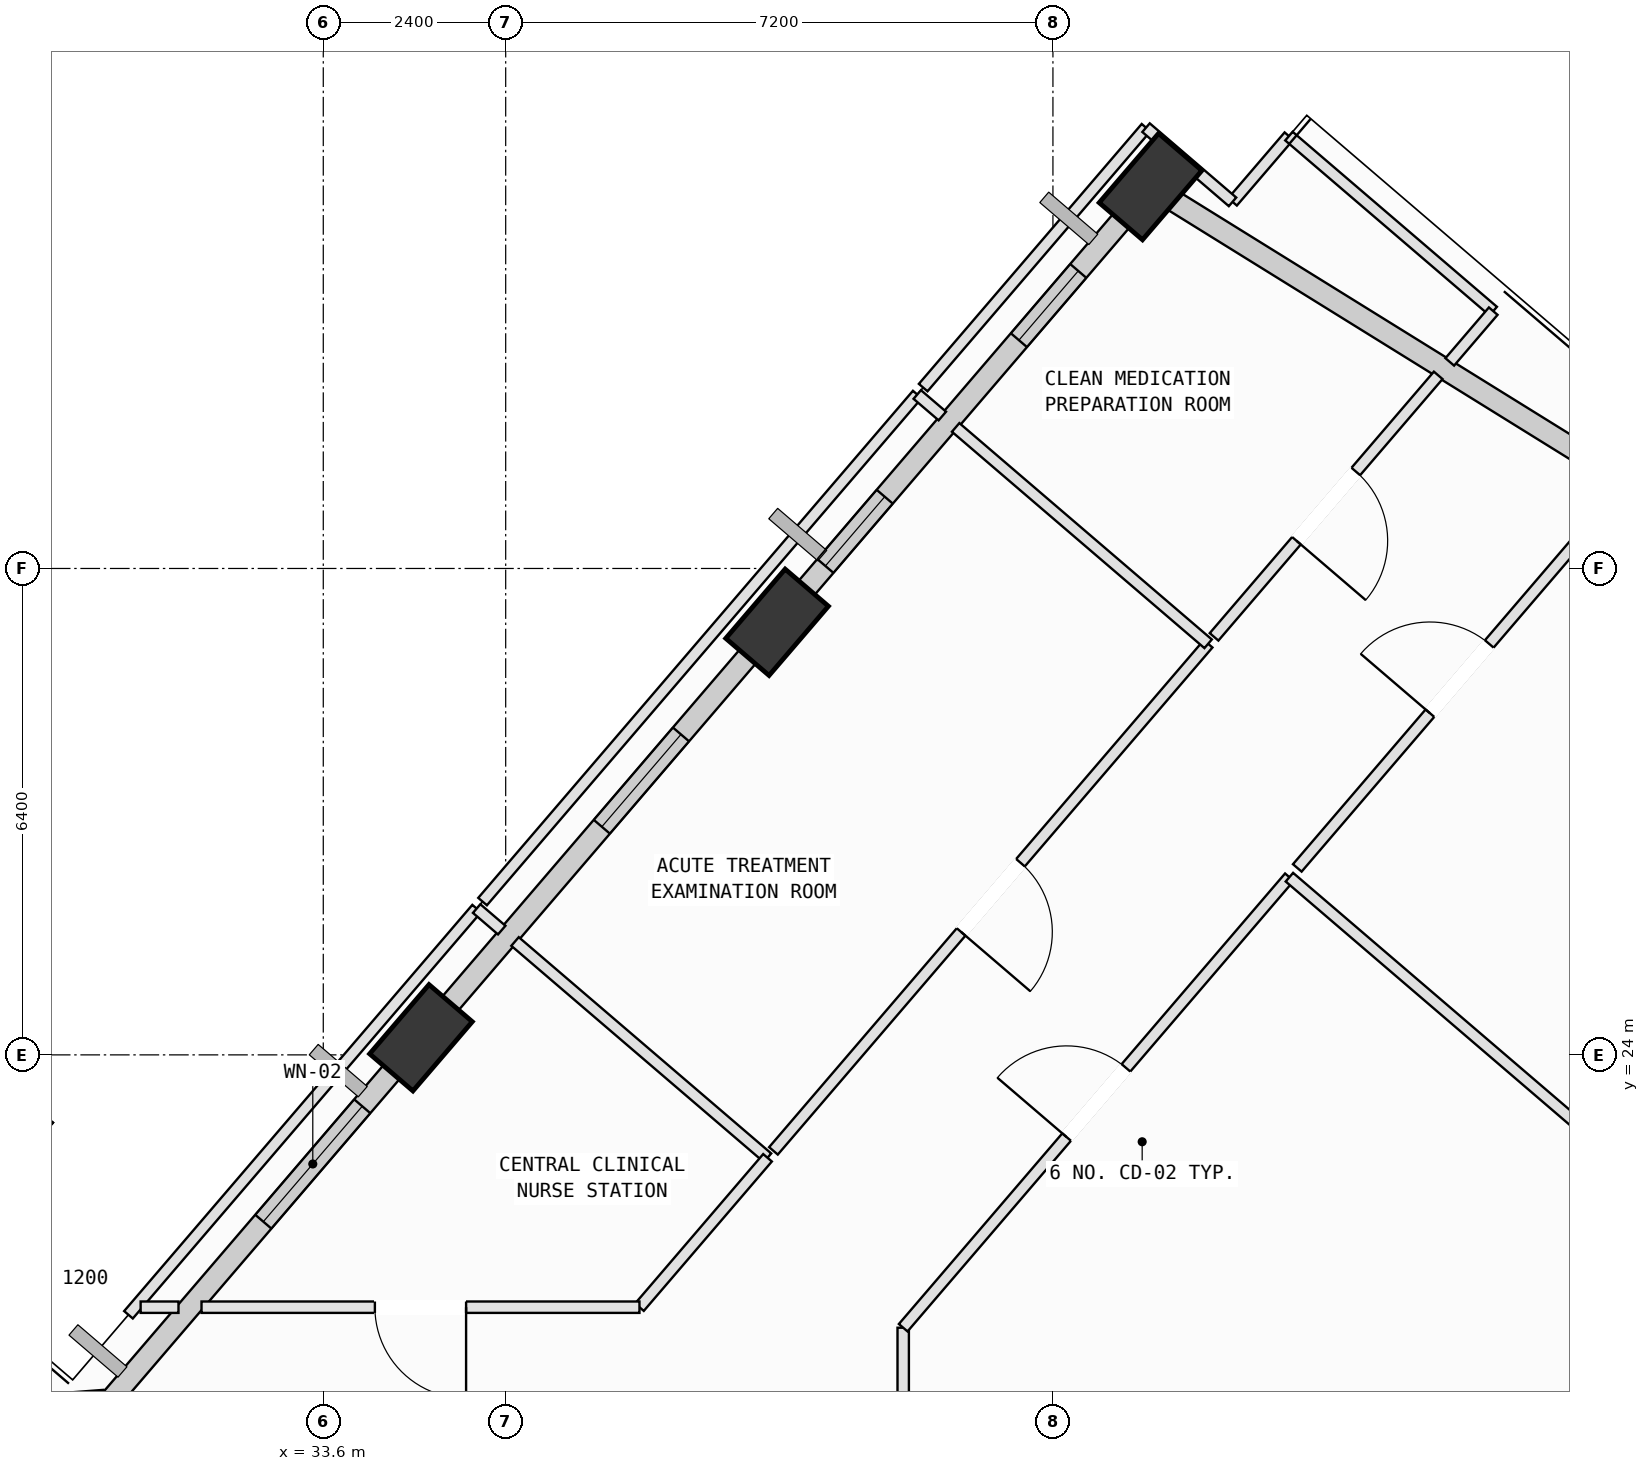
"""IFC4 building model, lengths in metres.
Left out: names, types, materials, properties, quantities, classifications, styles, units other than length and angle.
Written with IfcOpenShell. Run it as: python <this file> out.ifc"""

import sys

from ifc_helpers import new_model, si_unit, direction, frame, frame_2d, origin, origin_2d, place, context, subcontext, project, spatial, rectangle, extrude, element, fill, save


model = new_model("IFC4")
c1 = context("Model", 3, precision=1e-05, world=origin(), true_north=direction((0.0, 1.0)))
c2 = subcontext(c1, "Body", "Model", "MODEL_VIEW")
j1 = project(units=[si_unit("LENGTHUNIT", "METRE"), si_unit("PLANEANGLEUNIT", "RADIAN")], contexts=[c1])
p1 = place(None, origin())
s1 = spatial("IfcSite", under=j1, at=p1, CompositionType="ELEMENT")
p2 = place(p1, origin())
s2 = spatial("IfcBuilding", under=s1, at=p2, CompositionType="ELEMENT")
p3 = place(p2, frame((0.0, 0.0, 235.2)))
s3 = spatial("IfcBuildingStorey", under=s2, at=p3, CompositionType="ELEMENT", Elevation=235.2)
p4 = place(p3, frame((44.484, 35.425, 0.002), z_axis=(-0.04432527086, 0.044630121416, 0.998019750619), x_axis=(0.072242174873, -0.996243007169, 0.047759175416)))
e1 = element("IfcColumn", 1, at=p4, inside=s3, PredefinedType="COLUMN", context=c2, shape_type="SweptSolid", body=[
    extrude(rectangle(XDim=1.2, YDim=0.75, at=origin_2d()), origin(), (0.0, 0.0, 1.0), 4.004),
])
p5 = place(p3, frame((39.571, 29.692, 0.002), z_axis=(-0.020455033896, 0.024607100478, 0.999487909979), x_axis=(-0.015334973409, -0.999587193409, 0.024295706693)))
e2 = element("IfcColumn", 2, at=p5, inside=s3, PredefinedType="COLUMN", context=c2, shape_type="SweptSolid", body=[
    extrude(rectangle(XDim=1.2, YDim=0.75, at=origin_2d()), origin(), (0.0, 0.0, 1.0), 3.998),
])
p6 = place(p3, frame((34.885, 24.225, 0.002), z_axis=(0.002382511195, 0.005375922696, 0.999982711398), x_axis=(-0.902595371607, -0.430466795251, 0.004464676979)))
e3 = element("IfcColumn", 3, at=p6, inside=s3, PredefinedType="COLUMN", context=c2, shape_type="SweptSolid", body=[
    extrude(rectangle(XDim=1.2, YDim=0.75, at=origin_2d()), origin(), (0.0, 0.0, 1.0), 3.996),
])
p7 = place(p3, frame((44.717, 35.28, 0.0), z_axis=(0.0, 0.0, 1.0), x_axis=(0.849811688813, -0.527086419439, 0.0)))
e4 = element("IfcWall", 4, at=p7, inside=s3, PredefinedType="SOLIDWALL", context=c2, shape_type="SweptSolid", body=[
    extrude(rectangle(XDim=9.036, YDim=0.28, at=frame_2d((4.518, 0.0))), origin(), (0.0, 0.0, 1.0), 3.265),
])
p8 = place(p3, frame((39.833, 29.998, 0.0), z_axis=(0.0, 0.0, 1.0), x_axis=(0.650773580077, 0.759271853471, 0.0)))
e5 = element("IfcWall", 5, at=p8, inside=s3, PredefinedType="SOLIDWALL", context=c2, shape_type="SweptSolid", body=[
    extrude(rectangle(XDim=6.78, YDim=0.28, at=frame_2d((3.39, 0.0))), origin(), (0.0, 0.0, 1.0), 3.265),
])
p9 = place(p8, frame((4.486, 0.0, 0.75)))
e6 = element("IfcOpeningElement", 6, at=p9, cuts=e5, PredefinedType="OPENING", context=c2, shape_type="SweptSolid", body=[
    extrude(rectangle(XDim=1.2, YDim=1.75, at=frame_2d((0.6, 0.875))), frame((0.0, 0.15, 0.0), z_axis=(0.0, -1.0, 0.0), x_axis=(1.0, 0.0, 0.0)), (0.0, 0.0, 1.0), 0.3),
])
p10 = place(p8, frame((0.573, 0.0, 0.75)))
e7 = element("IfcOpeningElement", 7, at=p10, cuts=e5, PredefinedType="OPENING", context=c2, shape_type="SweptSolid", body=[
    extrude(rectangle(XDim=1.2, YDim=1.75, at=frame_2d((0.6, 0.875))), frame((0.0, 0.15, 0.0), z_axis=(0.0, -1.0, 0.0), x_axis=(1.0, 0.0, 0.0)), (0.0, 0.0, 1.0), 0.3),
])
p11 = place(p3, frame((35.151, 24.535, 0.0), z_axis=(0.0, 0.0, 1.0), x_axis=(0.65076314179, 0.759280800026, 0.0)))
e8 = element("IfcWall", 8, at=p11, inside=s3, PredefinedType="SOLIDWALL", context=c2, shape_type="SweptSolid", body=[
    extrude(rectangle(XDim=6.41, YDim=0.28, at=frame_2d((3.205, 0.0))), origin(), (0.0, 0.0, 1.0), 3.265),
])
p12 = place(p11, frame((3.248, 0.0, 0.75)))
e9 = element("IfcOpeningElement", 9, at=p12, cuts=e8, PredefinedType="OPENING", context=c2, shape_type="SweptSolid", body=[
    extrude(rectangle(XDim=1.6, YDim=1.95, at=frame_2d((0.8, 0.975))), frame((0.0, 0.15, 0.0), z_axis=(0.0, -1.0, 0.0), x_axis=(1.0, 0.0, 0.0)), (0.0, 0.0, 1.0), 0.3),
])
p13 = place(p3, frame((30.626, 19.256, 0.0), z_axis=(0.0, 0.0, 1.0), x_axis=(0.650768519131, 0.75927619119, 0.0)))
e10 = element("IfcWall", 10, at=p13, inside=s3, PredefinedType="SOLIDWALL", context=c2, shape_type="SweptSolid", body=[
    extrude(rectangle(XDim=6.158, YDim=0.28, at=frame_2d((3.079, 0.0))), origin(), (0.0, 0.0, 1.0), 3.265),
])
p14 = place(p13, frame((3.357, 0.0, 0.75)))
e11 = element("IfcOpeningElement", 11, at=p14, cuts=e10, PredefinedType="OPENING", context=c2, shape_type="SweptSolid", body=[
    extrude(rectangle(XDim=2.0, YDim=1.95, at=frame_2d((1.0, 0.975))), frame((0.0, 0.15, 0.0), z_axis=(0.0, -1.0, 0.0), x_axis=(1.0, 0.0, 0.0)), (0.0, 0.0, 1.0), 0.3),
])
p15 = place(p3, frame((41.23, 17.95, 0.0), z_axis=(0.0, 0.0, 1.0), x_axis=(0.0, 1.0, 0.0)))
e12 = element("IfcWall", 12, at=p15, inside=s3, PredefinedType="PARTITIONING", context=c2, shape_type="SweptSolid", body=[
    extrude(rectangle(XDim=2.46, YDim=0.15, at=frame_2d((1.23, 0.0))), origin(), (0.0, 0.0, 1.0), 3.78),
])
p16 = place(p3, frame((41.23, 20.41, 0.0), z_axis=(0.0, 0.0, 1.0), x_axis=(0.650786223128, 0.759261016902, 0.0)))
e13 = element("IfcWall", 13, at=p16, inside=s3, PredefinedType="PARTITIONING", context=c2, shape_type="SweptSolid", body=[
    extrude(rectangle(XDim=7.808, YDim=0.15, at=frame_2d((3.904, 0.0))), origin(), (0.0, 0.0, 1.0), 3.78),
])
p17 = place(p16, frame((3.304, 0.0, 0.0)))
e14 = element("IfcOpeningElement", 14, at=p17, cuts=e13, PredefinedType="OPENING", context=c2, shape_type="SweptSolid", body=[
    extrude(rectangle(XDim=1.2, YDim=2.15, at=frame_2d((0.6, 1.075))), frame((0.0, 0.085, 0.0), z_axis=(0.0, -1.0, 0.0), x_axis=(1.0, 0.0, 0.0)), (0.0, 0.0, 1.0), 0.17),
])
p18 = place(p3, frame((46.311, 26.338, 0.0), z_axis=(0.0, 0.0, 1.0), x_axis=(0.759307720166, -0.650731731281, 0.0)))
e15 = element("IfcWall", 15, at=p18, inside=s3, PredefinedType="PARTITIONING", context=c2, shape_type="SweptSolid", body=[
    extrude(rectangle(XDim=13.485, YDim=0.15, at=frame_2d((6.742, 0.0))), origin(), (0.0, 0.0, 1.0), 3.78),
])
p19 = place(p3, frame((46.415, 26.46, 0.0), z_axis=(0.0, 0.0, 1.0), x_axis=(0.650766865256, 0.759277608708, 0.0)))
e16 = element("IfcWall", 16, at=p19, inside=s3, PredefinedType="PARTITIONING", context=c2, shape_type="SweptSolid", body=[
    extrude(rectangle(XDim=6.563, YDim=0.15, at=frame_2d((3.281, 0.0))), origin(), (0.0, 0.0, 1.0), 3.78),
])
p20 = place(p19, frame((2.681, 0.0, 0.0)))
e17 = element("IfcOpeningElement", 17, at=p20, cuts=e16, PredefinedType="OPENING", context=c2, shape_type="SweptSolid", body=[
    extrude(rectangle(XDim=1.2, YDim=2.15, at=frame_2d((0.6, 1.075))), frame((0.0, 0.085, 0.0), z_axis=(0.0, -1.0, 0.0), x_axis=(1.0, 0.0, 0.0)), (0.0, 0.0, 1.0), 0.17),
])
p21 = place(p3, frame((31.037, 20.58, 0.0), z_axis=(0.0, 0.0, 1.0), x_axis=(0.650742816993, 0.759298219497, 0.0)))
e18 = element("IfcWall", 18, at=p21, inside=s3, PredefinedType="PARTITIONING", context=c2, shape_type="SweptSolid", body=[
    extrude(rectangle(XDim=7.039, YDim=0.15, at=frame_2d((3.52, 0.0))), origin(), (0.0, 0.0, 1.0), 3.78),
])
p22 = place(p3, frame((35.618, 25.925, 0.0), z_axis=(0.0, 0.0, 1.0), x_axis=(0.759216962062, -0.650837617626, 0.0)))
e19 = element("IfcWall", 19, at=p22, inside=s3, PredefinedType="PARTITIONING", context=c2, shape_type="SweptSolid", body=[
    extrude(rectangle(XDim=0.435, YDim=0.15, at=frame_2d((0.217, 0.0))), origin(), (0.0, 0.0, 1.0), 3.78),
])
p23 = place(p3, frame((36.123, 25.492, 0.0), z_axis=(0.0, 0.0, 1.0), x_axis=(0.759425980715, -0.650593713323, 0.0)))
e20 = element("IfcWall", 20, at=p23, inside=s3, PredefinedType="PARTITIONING", context=c2, shape_type="SweptSolid", body=[
    extrude(rectangle(XDim=4.374, YDim=0.15, at=frame_2d((2.187, 0.0))), origin(), (0.0, 0.0, 1.0), 3.78),
])
p24 = place(p3, frame((39.445, 22.646, 0.0), z_axis=(0.0, 0.0, 1.0), x_axis=(-0.650760314073, -0.759283223592, 0.0)))
e21 = element("IfcWall", 21, at=p24, inside=s3, PredefinedType="PARTITIONING", context=c2, shape_type="SweptSolid", body=[
    extrude(rectangle(XDim=2.589, YDim=0.15, at=frame_2d((1.295, 0.0))), origin(), (0.0, 0.0, 1.0), 3.78),
])
p25 = place(p3, frame((37.76, 20.68, 0.0), z_axis=(0.0, 0.0, 1.0), x_axis=(-1.0, 0.0, 0.0)))
e22 = element("IfcWall", 22, at=p25, inside=s3, PredefinedType="PARTITIONING", context=c2, shape_type="SweptSolid", body=[
    extrude(rectangle(XDim=5.762, YDim=0.15, at=frame_2d((2.881, 0.0))), origin(), (0.0, 0.0, 1.0), 3.415),
])
p26 = place(p25, frame((2.281, 0.0, 0.0)))
e23 = element("IfcOpeningElement", 23, at=p26, cuts=e22, PredefinedType="OPENING", context=c2, shape_type="SweptSolid", body=[
    extrude(rectangle(XDim=1.2, YDim=2.15, at=frame_2d((0.6, 1.075))), frame((0.0, 0.085, 0.0), z_axis=(0.0, -1.0, 0.0), x_axis=(1.0, 0.0, 0.0)), (0.0, 0.0, 1.0), 0.17),
])
p27 = place(p3, frame((31.695, 20.68, 0.0), z_axis=(0.0, 0.0, 1.0), x_axis=(-1.0, 0.0, 0.0)))
e24 = element("IfcWall", 24, at=p27, inside=s3, PredefinedType="PARTITIONING", context=c2, shape_type="SweptSolid", body=[
    extrude(rectangle(XDim=0.498, YDim=0.15, at=frame_2d((0.249, 0.0))), origin(), (0.0, 0.0, 1.0), 3.78),
])
p28 = place(p3, frame((45.242, 29.409, 0.0), z_axis=(0.0, 0.0, 1.0), x_axis=(-0.650807389163, -0.759242874324, 0.0)))
e25 = element("IfcWall", 25, at=p28, inside=s3, PredefinedType="PARTITIONING", context=c2, shape_type="SweptSolid", body=[
    extrude(rectangle(XDim=8.788, YDim=0.15, at=frame_2d((4.394, 0.0))), origin(), (0.0, 0.0, 1.0), 3.78),
])
p29 = place(p28, frame((3.794, 0.0, 0.0)))
e26 = element("IfcOpeningElement", 26, at=p29, cuts=e25, PredefinedType="OPENING", context=c2, shape_type="SweptSolid", body=[
    extrude(rectangle(XDim=1.2, YDim=2.15, at=frame_2d((0.6, 1.075))), frame((0.0, 0.085, 0.0), z_axis=(0.0, -1.0, 0.0), x_axis=(1.0, 0.0, 0.0)), (0.0, 0.0, 1.0), 0.17),
])
p30 = place(p3, frame((35.696, 26.017, 0.0), z_axis=(0.0, 0.0, 1.0), x_axis=(0.650807389163, 0.759242874324, 0.0)))
e27 = element("IfcWall", 27, at=p30, inside=s3, PredefinedType="PARTITIONING", context=c2, shape_type="SweptSolid", body=[
    extrude(rectangle(XDim=8.788, YDim=0.15, at=frame_2d((4.394, 0.0))), origin(), (0.0, 0.0, 1.0), 3.265),
])
p31 = place(p3, frame((41.415, 32.689, 0.0), z_axis=(0.0, 0.0, 1.0), x_axis=(0.759216962062, -0.650837617626, 0.0)))
e28 = element("IfcWall", 28, at=p31, inside=s3, PredefinedType="PARTITIONING", context=c2, shape_type="SweptSolid", body=[
    extrude(rectangle(XDim=0.435, YDim=0.15, at=frame_2d((0.217, 0.0))), origin(), (0.0, 0.0, 1.0), 3.78),
])
p32 = place(p3, frame((41.92, 32.256, 0.0), z_axis=(0.0, 0.0, 1.0), x_axis=(0.75928811279, -0.650754609492, 0.0)))
e29 = element("IfcWall", 29, at=p32, inside=s3, PredefinedType="PARTITIONING", context=c2, shape_type="SweptSolid", body=[
    extrude(rectangle(XDim=4.375, YDim=0.15, at=frame_2d((2.188, 0.0))), origin(), (0.0, 0.0, 1.0), 3.78),
])
p33 = place(p3, frame((45.563, 35.224, 0.0), z_axis=(0.0, 0.0, 1.0), x_axis=(0.651055975456, 0.759029720645, 0.0)))
e30 = element("IfcWall", 30, at=p33, inside=s3, PredefinedType="PARTITIONING", context=c2, shape_type="SweptSolid", body=[
    extrude(rectangle(XDim=1.14, YDim=0.15, at=frame_2d((0.57, 0.0))), origin(), (0.0, 0.0, 1.0), 3.78),
])
p34 = place(p3, frame((46.305, 36.089, 0.0), z_axis=(0.0, 0.0, 1.0), x_axis=(0.759363699, -0.650666406572, 0.0)))
e31 = element("IfcWall", 31, at=p34, inside=s3, PredefinedType="PARTITIONING", context=c2, shape_type="SweptSolid", body=[
    extrude(rectangle(XDim=3.54, YDim=0.15, at=frame_2d((1.77, 0.0))), origin(), (0.0, 0.0, 1.0), 3.78),
])
p35 = place(p3, frame((48.993, 33.786, 0.0), z_axis=(0.0, 0.0, 1.0), x_axis=(-0.65044837278, -0.759550468598, 0.0)))
e32 = element("IfcWall", 32, at=p35, inside=s3, PredefinedType="PARTITIONING", context=c2, shape_type="SweptSolid", body=[
    extrude(rectangle(XDim=0.879, YDim=0.15, at=frame_2d((0.44, 0.0))), origin(), (0.0, 0.0, 1.0), 3.78),
])
p36 = place(p3, frame((48.269, 32.941, 0.0), z_axis=(0.0, 0.0, 1.0), x_axis=(-0.650742568716, -0.759298432278, 0.0)))
e33 = element("IfcWall", 33, at=p36, inside=s3, PredefinedType="PARTITIONING", context=c2, shape_type="SweptSolid", body=[
    extrude(rectangle(XDim=4.532, YDim=0.15, at=frame_2d((2.266, 0.0))), origin(), (0.0, 0.0, 1.0), 3.78),
])
p37 = place(p36, frame((1.666, 0.0, 0.0)))
e34 = element("IfcOpeningElement", 34, at=p37, cuts=e33, PredefinedType="OPENING", context=c2, shape_type="SweptSolid", body=[
    extrude(rectangle(XDim=1.2, YDim=2.15, at=frame_2d((0.6, 1.075))), frame((0.0, 0.085, 0.0), z_axis=(0.0, -1.0, 0.0), x_axis=(1.0, 0.0, 0.0)), (0.0, 0.0, 1.0), 0.17),
])
p38 = place(p3, frame((41.493, 32.78, 0.0), z_axis=(0.0, 0.0, 1.0), x_axis=(0.65088955775, 0.759172433385, 0.0)))
e35 = element("IfcWall", 35, at=p38, inside=s3, PredefinedType="PARTITIONING", context=c2, shape_type="SweptSolid", body=[
    extrude(rectangle(XDim=4.505, YDim=0.15, at=frame_2d((2.252, 0.0))), origin(), (0.0, 0.0, 1.0), 3.265),
])
p39 = place(p3, frame((44.425, 36.2, 0.0), z_axis=(0.0, 0.0, 1.0), x_axis=(0.759107131063, -0.650965716125, 0.0)))
e36 = element("IfcWall", 36, at=p39, inside=s3, PredefinedType="PARTITIONING", context=c2, shape_type="SweptSolid", body=[
    extrude(rectangle(XDim=1.499, YDim=0.15, at=frame_2d((0.75, 0.0))), origin(), (0.0, 0.0, 1.0), 3.265),
])
p40 = place(p9, origin())
e37 = element("IfcWindow", 37, at=p40, inside=s3, PartitioningType="SINGLE_PANEL", PredefinedType="WINDOW", context=c2, shape_type="SweptSolid", body=[
    extrude(rectangle(XDim=1.2, YDim=1.75, at=frame_2d((0.6, 0.875))), frame((0.0, 0.03, 0.0), z_axis=(0.0, -1.0, 0.0), x_axis=(1.0, 0.0, 0.0)), (0.0, 0.0, 1.0), 0.06),
])
fill(e6, e37)
p41 = place(p10, origin())
e38 = element("IfcWindow", 38, at=p41, inside=s3, PartitioningType="SINGLE_PANEL", PredefinedType="WINDOW", context=c2, shape_type="SweptSolid", body=[
    extrude(rectangle(XDim=1.2, YDim=1.75, at=frame_2d((0.6, 0.875))), frame((0.0, 0.03, 0.0), z_axis=(0.0, -1.0, 0.0), x_axis=(1.0, 0.0, 0.0)), (0.0, 0.0, 1.0), 0.06),
])
fill(e7, e38)
p42 = place(p12, origin())
e39 = element("IfcWindow", 39, at=p42, inside=s3, PartitioningType="SINGLE_PANEL", PredefinedType="WINDOW", context=c2, shape_type="SweptSolid", body=[
    extrude(rectangle(XDim=1.6, YDim=1.95, at=frame_2d((0.8, 0.975))), frame((0.0, 0.03, 0.0), z_axis=(0.0, -1.0, 0.0), x_axis=(1.0, 0.0, 0.0)), (0.0, 0.0, 1.0), 0.06),
])
fill(e9, e39)
p43 = place(p14, origin())
e40 = element("IfcWindow", 40, at=p43, inside=s3, PartitioningType="SINGLE_PANEL", PredefinedType="WINDOW", context=c2, shape_type="SweptSolid", body=[
    extrude(rectangle(XDim=2.0, YDim=1.95, at=frame_2d((1.0, 0.975))), frame((0.0, 0.03, 0.0), z_axis=(0.0, -1.0, 0.0), x_axis=(1.0, 0.0, 0.0)), (0.0, 0.0, 1.0), 0.06),
])
fill(e11, e40)
p44 = place(p17, origin())
e41 = element("IfcDoor", 41, at=p44, inside=s3, OperationType="SINGLE_SWING_LEFT", PredefinedType="DOOR", context=c2, shape_type="SweptSolid", body=[
    extrude(rectangle(XDim=1.2, YDim=2.15, at=frame_2d((0.6, 1.075))), frame((0.0, 0.025, 0.0), z_axis=(0.0, -1.0, 0.0), x_axis=(1.0, 0.0, 0.0)), (0.0, 0.0, 1.0), 0.05),
])
fill(e14, e41)
p45 = place(p20, origin())
e42 = element("IfcDoor", 42, at=p45, inside=s3, OperationType="SINGLE_SWING_LEFT", PredefinedType="DOOR", context=c2, shape_type="SweptSolid", body=[
    extrude(rectangle(XDim=1.2, YDim=2.15, at=frame_2d((0.6, 1.075))), frame((0.0, 0.025, 0.0), z_axis=(0.0, -1.0, 0.0), x_axis=(1.0, 0.0, 0.0)), (0.0, 0.0, 1.0), 0.05),
])
fill(e17, e42)
p46 = place(p26, origin())
e43 = element("IfcDoor", 43, at=p46, inside=s3, OperationType="SINGLE_SWING_LEFT", PredefinedType="DOOR", context=c2, shape_type="SweptSolid", body=[
    extrude(rectangle(XDim=1.2, YDim=2.15, at=frame_2d((0.6, 1.075))), frame((0.0, 0.025, 0.0), z_axis=(0.0, -1.0, 0.0), x_axis=(1.0, 0.0, 0.0)), (0.0, 0.0, 1.0), 0.05),
])
fill(e23, e43)
p47 = place(p29, origin())
e44 = element("IfcDoor", 44, at=p47, inside=s3, OperationType="SINGLE_SWING_RIGHT", PredefinedType="DOOR", context=c2, shape_type="SweptSolid", body=[
    extrude(rectangle(XDim=1.2, YDim=2.15, at=frame_2d((0.6, 1.075))), frame((0.0, 0.025, 0.0), z_axis=(0.0, -1.0, 0.0), x_axis=(1.0, 0.0, 0.0)), (0.0, 0.0, 1.0), 0.05),
])
fill(e26, e44)
p48 = place(p37, origin())
e45 = element("IfcDoor", 45, at=p48, inside=s3, OperationType="SINGLE_SWING_RIGHT", PredefinedType="DOOR", context=c2, shape_type="SweptSolid", body=[
    extrude(rectangle(XDim=1.2, YDim=2.15, at=frame_2d((0.6, 1.075))), frame((0.0, 0.025, 0.0), z_axis=(0.0, -1.0, 0.0), x_axis=(1.0, 0.0, 0.0)), (0.0, 0.0, 1.0), 0.05),
])
fill(e34, e45)
save(model, sys.argv[1])
